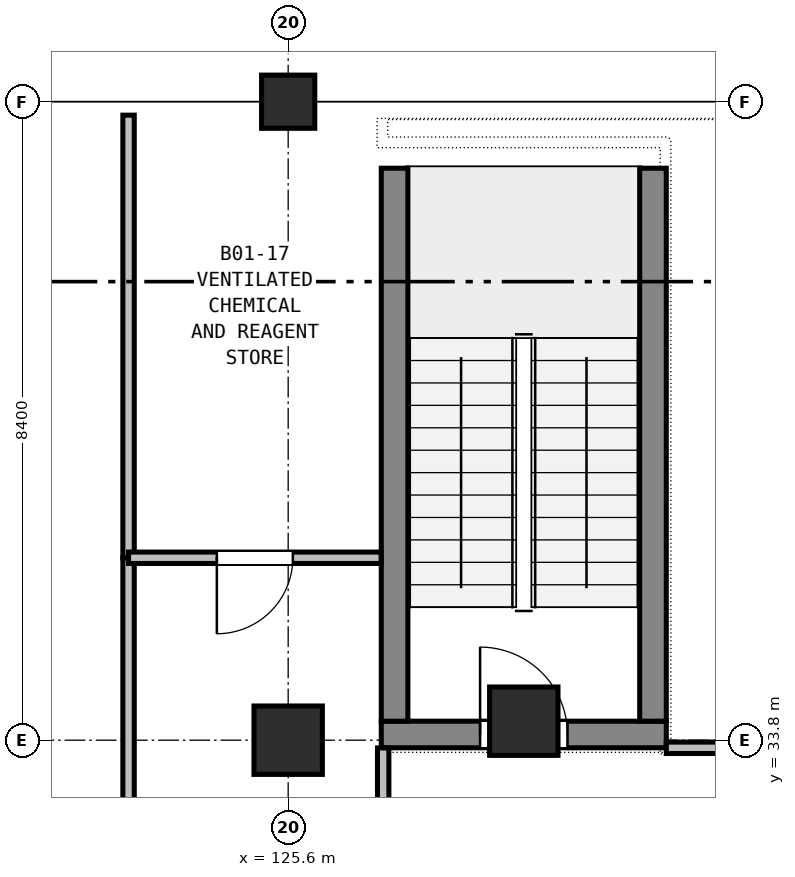
"""IFC4 building model, lengths in metres.
Left out: names, types, materials, properties, quantities, classifications, styles, units other than length and angle.
Written with IfcOpenShell. Run it as: python <this file> out.ifc"""

import sys

from ifc_helpers import new_model, si_unit, direction, frame, frame_2d, origin, origin_2d, place, context, subcontext, project, spatial, rectangle, extrude, element, fill, save


model = new_model("IFC4")
c1 = context("Model", 3, precision=1e-05, world=origin(), true_north=direction((0.0, 1.0)))
c2 = subcontext(c1, "Body", "Model", "MODEL_VIEW")
j1 = project(units=[si_unit("LENGTHUNIT", "METRE"), si_unit("PLANEANGLEUNIT", "RADIAN")], contexts=[c1])
p1 = place(None, origin())
s1 = spatial("IfcSite", under=j1, at=p1, CompositionType="ELEMENT")
p2 = place(p1, origin())
s2 = spatial("IfcBuilding", under=s1, at=p2, CompositionType="ELEMENT")
p3 = place(p2, frame((0.0, 0.0, -4.5)))
s3 = spatial("IfcBuildingStorey", under=s2, at=p3, CompositionType="ELEMENT", Elevation=-4.5)
for number, where, z_axis, x_axis in (
    (1, (125.6, 33.8, 0.0), (0.0, 0.0, 1.0), (1.0, 0.0, 0.0)),
    (2, (125.6, 42.2, 0.0), (0.0, 0.0, 1.0), (1.0, 0.0, 0.0)),
):
    element("IfcColumn", number, at=place(p3, frame(where, z_axis=z_axis, x_axis=x_axis)), inside=s3, PredefinedType="COLUMN", context=c2, shape_type="SweptSolid", body=[
        extrude(rectangle(XDim=0.7, YDim=0.7, at=origin_2d()), origin(), (0.0, 0.0, 1.0), 4.5),
    ])
p4 = place(p3, frame((126.825, 33.875, 0.0), z_axis=(0.0, 0.0, 1.0), x_axis=(1.0, 0.0, 0.0)))
e3 = element("IfcWall", 3, at=p4, inside=s3, PredefinedType="SHEAR", context=c2, shape_type="SweptSolid", body=[
    extrude(rectangle(XDim=3.75, YDim=0.35, at=frame_2d((1.875, 0.0))), origin(), (0.0, 0.0, 1.0), 4.5),
])
p5 = place(p4, frame((1.3, 0.0, 0.0)))
e4 = element("IfcOpeningElement", 4, at=p5, cuts=e3, PredefinedType="OPENING", context=c2, shape_type="SweptSolid", body=[
    extrude(rectangle(XDim=1.15, YDim=2.15, at=frame_2d((0.575, 1.075))), frame((0.0, 0.185, 0.0), z_axis=(0.0, -1.0, 0.0), x_axis=(1.0, 0.0, 0.0)), (0.0, 0.0, 1.0), 0.37),
])
p6 = place(p3, frame((126.825, 41.5, 0.0), z_axis=(0.0, 0.0, 1.0), x_axis=(1.0, 0.0, 0.0)))
e5 = element("IfcWall", 5, at=p6, inside=s3, PredefinedType="SHEAR", context=c2, shape_type="SweptSolid", body=[
    extrude(rectangle(XDim=3.75, YDim=0.35, at=frame_2d((1.875, 0.0))), origin(), (0.0, 0.0, 1.0), 4.5),
])
for number, where, z_axis, x_axis in (
    (6, (127.0, 34.05, 0.0), (0.0, 0.0, 1.0), (0.0, 1.0, 0.0)),
    (7, (130.4, 34.05, 0.0), (0.0, 0.0, 1.0), (0.0, 1.0, 0.0)),
):
    element("IfcWall", number, at=place(p3, frame(where, z_axis=z_axis, x_axis=x_axis)), inside=s3, PredefinedType="SHEAR", context=c2, shape_type="SweptSolid", body=[
        extrude(rectangle(XDim=7.275, YDim=0.35, at=frame_2d((3.637, 0.0))), origin(), (0.0, 0.0, 1.0), 4.5),
    ])
p7 = place(p3, frame((99.025, 42.2, 0.0), z_axis=(0.0, 0.0, 1.0), x_axis=(1.0, 0.0, 0.0)))
e8 = element("IfcWall", 8, at=p7, inside=s3, PredefinedType="SOLIDWALL", context=c2, shape_type="SweptSolid", body=[
    extrude(rectangle(XDim=33.35, YDim=0.35, at=frame_2d((16.675, 0.0))), origin(), (0.0, 0.0, 1.0), 4.5),
])
for number, where, z_axis, x_axis in (
    (9, (125.6, 33.8, -1.2), (0.0, 0.0, 1.0), (1.0, 0.0, 0.0)),
    (10, (128.7, 34.05, -1.2), (0.0, 0.0, 1.0), (1.0, 0.0, 0.0)),
):
    element("IfcColumn", number, at=place(p3, frame(where, z_axis=z_axis, x_axis=x_axis)), inside=s3, PredefinedType="COLUMN", context=c2, shape_type="SweptSolid", body=[
        extrude(rectangle(XDim=0.9, YDim=0.9, at=origin_2d()), origin(), (0.0, 0.0, 1.0), 1.2),
    ])
p8 = place(p3, frame((130.575, 33.7, 0.0), z_axis=(0.0, 0.0, 1.0), x_axis=(1.0, 0.0, 0.0)))
e11 = element("IfcWall", 11, at=p8, inside=s3, PredefinedType="PARTITIONING", context=c2, shape_type="SweptSolid", body=[
    extrude(rectangle(XDim=1.275, YDim=0.15, at=frame_2d((0.638, 0.0))), origin(), (0.0, 0.0, 1.0), 3.835),
])
p9 = place(p3, frame((126.85, 30.1, 0.0), z_axis=(0.0, 0.0, 1.0), x_axis=(0.0, 1.0, 0.0)))
e12 = element("IfcWall", 12, at=p9, inside=s3, PredefinedType="PARTITIONING", context=c2, shape_type="SweptSolid", body=[
    extrude(rectangle(XDim=3.598, YDim=0.15, at=frame_2d((1.799, 0.0))), origin(), (0.0, 0.0, 1.0), 3.835),
])
p10 = place(p3, frame((123.5, 42.023, 0.0), z_axis=(0.0, 0.0, 1.0), x_axis=(0.0, -1.0, 0.0)))
e13 = element("IfcWall", 13, at=p10, inside=s3, PredefinedType="PARTITIONING", context=c2, shape_type="SweptSolid", body=[
    extrude(rectangle(XDim=5.823, YDim=0.15, at=frame_2d((2.912, 0.0))), origin(), (0.0, 0.0, 1.0), 4.175),
])
p11 = place(p3, frame((123.5, 36.2, 0.0), z_axis=(0.0, 0.0, 1.0), x_axis=(0.0, -1.0, 0.0)))
e14 = element("IfcWall", 14, at=p11, inside=s3, PredefinedType="PARTITIONING", context=c2, shape_type="SweptSolid", body=[
    extrude(rectangle(XDim=3.198, YDim=0.15, at=frame_2d((1.599, 0.0))), origin(), (0.0, 0.0, 1.0), 3.835),
])
p12 = place(p3, frame((126.823, 36.2, 0.0), z_axis=(0.0, 0.0, 1.0), x_axis=(-1.0, 0.0, 0.0)))
e15 = element("IfcWall", 15, at=p12, inside=s3, PredefinedType="PARTITIONING", context=c2, shape_type="SweptSolid", body=[
    extrude(rectangle(XDim=3.323, YDim=0.15, at=frame_2d((1.662, 0.0))), origin(), (0.0, 0.0, 1.0), 3.635),
])
p13 = place(p12, frame((1.162, 0.0, 0.0)))
e16 = element("IfcOpeningElement", 16, at=p13, cuts=e15, PredefinedType="OPENING", context=c2, shape_type="SweptSolid", body=[
    extrude(rectangle(XDim=1.0, YDim=2.1, at=frame_2d((0.5, 1.05))), frame((0.0, 0.085, 0.0), z_axis=(0.0, -1.0, 0.0), x_axis=(1.0, 0.0, 0.0)), (0.0, 0.0, 1.0), 0.17),
])
p14 = place(p5, origin())
e17 = element("IfcDoor", 17, at=p14, inside=s3, OperationType="SINGLE_SWING_LEFT", PredefinedType="DOOR", context=c2, shape_type="SweptSolid", body=[
    extrude(rectangle(XDim=1.15, YDim=2.15, at=frame_2d((0.575, 1.075))), frame((0.0, 0.025, 0.0), z_axis=(0.0, -1.0, 0.0), x_axis=(1.0, 0.0, 0.0)), (0.0, 0.0, 1.0), 0.05),
])
fill(e4, e17)
p15 = place(p13, origin())
e18 = element("IfcDoor", 18, at=p15, inside=s3, OperationType="SINGLE_SWING_RIGHT", PredefinedType="DOOR", context=c2, shape_type="SweptSolid", body=[
    extrude(rectangle(XDim=1.0, YDim=2.1, at=frame_2d((0.5, 1.05))), frame((0.0, 0.025, 0.0), z_axis=(0.0, -1.0, 0.0), x_axis=(1.0, 0.0, 0.0)), (0.0, 0.0, 1.0), 0.05),
])
fill(e16, e18)
save(model, sys.argv[1])
